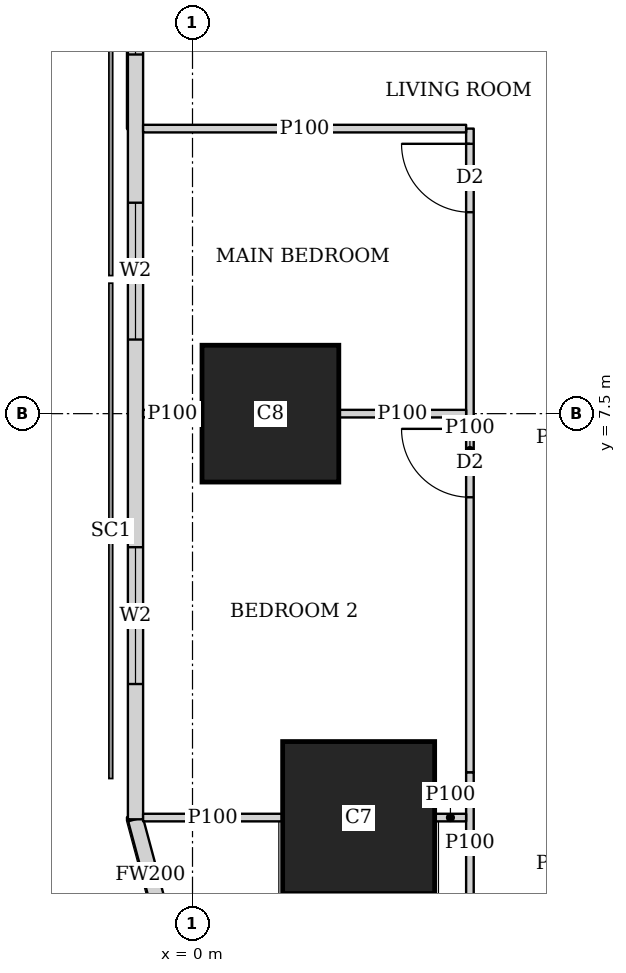
"""IFC4 building model, lengths in metres.
Left out: names, types, materials, properties, quantities, classifications, styles, units other than length and angle.
Written with IfcOpenShell. Run it as: python <this file> out.ifc"""

import sys

from ifc_helpers import new_model, si_unit, direction, frame, frame_2d, origin, origin_2d, place, context, subcontext, project, spatial, rectangle, extrude, element, fill, save


model = new_model("IFC4")
c1 = context("Model", 3, precision=1e-05, world=origin(), true_north=direction((0.0, 1.0)))
c2 = subcontext(c1, "Body", "Model", "MODEL_VIEW")
j1 = project(units=[si_unit("LENGTHUNIT", "METRE"), si_unit("PLANEANGLEUNIT", "RADIAN")], contexts=[c1])
p1 = place(None, origin())
s1 = spatial("IfcSite", under=j1, at=p1, CompositionType="ELEMENT")
p2 = place(p1, origin())
s2 = spatial("IfcBuilding", under=s1, at=p2, CompositionType="ELEMENT")
p3 = place(p2, frame((0.0, 0.0, 180.8)))
s3 = spatial("IfcBuildingStorey", under=s2, at=p3, CompositionType="ELEMENT", Elevation=180.8)
p4 = place(p3, frame((2.186, 2.186, 0.0), z_axis=(0.0, 0.0, 1.0), x_axis=(1.0, 0.0, 0.0)))
e1 = element("IfcColumn", 1, at=p4, inside=s3, PredefinedType="COLUMN", context=c2, shape_type="SweptSolid", body=[
    extrude(rectangle(XDim=2.0, YDim=2.0, at=origin_2d()), origin(), (0.0, 0.0, 1.0), 3.75),
])
p5 = place(p3, frame((1.025, 7.5, 0.0), z_axis=(0.0, 0.0, 1.0), x_axis=(1.0, 0.0, 0.0)))
e2 = element("IfcColumn", 2, at=p5, inside=s3, PredefinedType="COLUMN", context=c2, shape_type="SweptSolid", body=[
    extrude(rectangle(XDim=1.8, YDim=1.8, at=origin_2d()), origin(), (0.0, 0.0, 1.0), 3.75),
])
p6 = place(p3, frame((-0.75, 42.837, 0.0), z_axis=(0.0, 0.0, 1.0), x_axis=(0.0, -1.0, 0.0)))
e3 = element("IfcWall", 3, at=p6, inside=s3, PredefinedType="SOLIDWALL", context=c2, shape_type="SweptSolid", body=[
    extrude(rectangle(XDim=40.674, YDim=0.2, at=frame_2d((20.337, 0.0))), origin(), (0.0, 0.0, 1.0), 3.5),
])
p7 = place(p6, frame((1.78, 0.0, 0.9)))
e4 = element("IfcOpeningElement", 4, at=p7, cuts=e3, PredefinedType="OPENING", context=c2, shape_type="SweptSolid", body=[
    extrude(rectangle(XDim=1.8, YDim=1.5, at=frame_2d((0.9, 0.75))), frame((0.0, 0.11, 0.0), z_axis=(0.0, -1.0, 0.0), x_axis=(1.0, 0.0, 0.0)), (0.0, 0.0, 1.0), 0.22),
])
p8 = place(p6, frame((6.312, 0.0, 0.9)))
e5 = element("IfcOpeningElement", 5, at=p8, cuts=e3, PredefinedType="OPENING", context=c2, shape_type="SweptSolid", body=[
    extrude(rectangle(XDim=1.8, YDim=1.5, at=frame_2d((0.9, 0.75))), frame((0.0, 0.11, 0.0), z_axis=(0.0, -1.0, 0.0), x_axis=(1.0, 0.0, 0.0)), (0.0, 0.0, 1.0), 0.22),
])
p9 = place(p6, frame((10.062, 0.0, 0.9)))
e6 = element("IfcOpeningElement", 6, at=p9, cuts=e3, PredefinedType="OPENING", context=c2, shape_type="SweptSolid", body=[
    extrude(rectangle(XDim=1.8, YDim=1.5, at=frame_2d((0.9, 0.75))), frame((0.0, 0.11, 0.0), z_axis=(0.0, -1.0, 0.0), x_axis=(1.0, 0.0, 0.0)), (0.0, 0.0, 1.0), 0.22),
])
p10 = place(p6, frame((13.812, 0.0, 0.9)))
e7 = element("IfcOpeningElement", 7, at=p10, cuts=e3, PredefinedType="OPENING", context=c2, shape_type="SweptSolid", body=[
    extrude(rectangle(XDim=1.8, YDim=1.5, at=frame_2d((0.9, 0.75))), frame((0.0, 0.11, 0.0), z_axis=(0.0, -1.0, 0.0), x_axis=(1.0, 0.0, 0.0)), (0.0, 0.0, 1.0), 0.22),
])
p11 = place(p6, frame((17.562, 0.0, 0.9)))
e8 = element("IfcOpeningElement", 8, at=p11, cuts=e3, PredefinedType="OPENING", context=c2, shape_type="SweptSolid", body=[
    extrude(rectangle(XDim=1.8, YDim=1.5, at=frame_2d((0.9, 0.75))), frame((0.0, 0.11, 0.0), z_axis=(0.0, -1.0, 0.0), x_axis=(1.0, 0.0, 0.0)), (0.0, 0.0, 1.0), 0.22),
])
p12 = place(p6, frame((21.312, 0.0, 0.9)))
e9 = element("IfcOpeningElement", 9, at=p12, cuts=e3, PredefinedType="OPENING", context=c2, shape_type="SweptSolid", body=[
    extrude(rectangle(XDim=1.8, YDim=1.5, at=frame_2d((0.9, 0.75))), frame((0.0, 0.11, 0.0), z_axis=(0.0, -1.0, 0.0), x_axis=(1.0, 0.0, 0.0)), (0.0, 0.0, 1.0), 0.22),
])
p13 = place(p6, frame((25.062, 0.0, 0.9)))
e10 = element("IfcOpeningElement", 10, at=p13, cuts=e3, PredefinedType="OPENING", context=c2, shape_type="SweptSolid", body=[
    extrude(rectangle(XDim=1.8, YDim=1.5, at=frame_2d((0.9, 0.75))), frame((0.0, 0.11, 0.0), z_axis=(0.0, -1.0, 0.0), x_axis=(1.0, 0.0, 0.0)), (0.0, 0.0, 1.0), 0.22),
])
p14 = place(p6, frame((28.812, 0.0, 0.9)))
e11 = element("IfcOpeningElement", 11, at=p14, cuts=e3, PredefinedType="OPENING", context=c2, shape_type="SweptSolid", body=[
    extrude(rectangle(XDim=1.8, YDim=1.5, at=frame_2d((0.9, 0.75))), frame((0.0, 0.11, 0.0), z_axis=(0.0, -1.0, 0.0), x_axis=(1.0, 0.0, 0.0)), (0.0, 0.0, 1.0), 0.22),
])
p15 = place(p6, frame((32.562, 0.0, 0.9)))
e12 = element("IfcOpeningElement", 12, at=p15, cuts=e3, PredefinedType="OPENING", context=c2, shape_type="SweptSolid", body=[
    extrude(rectangle(XDim=1.8, YDim=1.5, at=frame_2d((0.9, 0.75))), frame((0.0, 0.11, 0.0), z_axis=(0.0, -1.0, 0.0), x_axis=(1.0, 0.0, 0.0)), (0.0, 0.0, 1.0), 0.22),
])
p16 = place(p6, frame((37.094, 0.0, 0.9)))
e13 = element("IfcOpeningElement", 13, at=p16, cuts=e3, PredefinedType="OPENING", context=c2, shape_type="SweptSolid", body=[
    extrude(rectangle(XDim=1.8, YDim=1.5, at=frame_2d((0.9, 0.75))), frame((0.0, 0.11, 0.0), z_axis=(0.0, -1.0, 0.0), x_axis=(1.0, 0.0, 0.0)), (0.0, 0.0, 1.0), 0.22),
])
p17 = place(p3, frame((-0.75, 2.163, 0.0), z_axis=(0.0, 0.0, 1.0), x_axis=(0.259168954497, -0.965832000415, 0.0)))
e14 = element("IfcWall", 14, at=p17, inside=s3, PredefinedType="SOLIDWALL", context=c2, shape_type="SweptSolid", body=[
    extrude(rectangle(XDim=1.513, YDim=0.2, at=frame_2d((0.756, 0.0))), origin(), (0.0, 0.0, 1.0), 3.5),
])
p18 = place(p3, frame((3.65, 0.912, 0.0), z_axis=(0.0, 0.0, 1.0), x_axis=(0.0, 1.0, 0.0)))
e15 = element("IfcWall", 15, at=p18, inside=s3, PredefinedType="PARTITIONING", context=c2, shape_type="SweptSolid", body=[
    extrude(rectangle(XDim=1.87, YDim=0.1, at=frame_2d((0.935, 0.0))), origin(), (0.0, 0.0, 1.0), 2.1),
])
p19 = place(p3, frame((3.65, 2.782, 0.0), z_axis=(0.0, 0.0, 1.0), x_axis=(0.0, 1.0, 0.0)))
e16 = element("IfcWall", 16, at=p19, inside=s3, PredefinedType="PARTITIONING", context=c2, shape_type="SweptSolid", body=[
    extrude(rectangle(XDim=8.468, YDim=0.1, at=frame_2d((4.234, 0.0))), origin(), (0.0, 0.0, 1.0), 3.5),
])
p20 = place(p19, frame((7.368, 0.0, 0.0)))
e17 = element("IfcOpeningElement", 17, at=p20, cuts=e16, PredefinedType="OPENING", context=c2, shape_type="SweptSolid", body=[
    extrude(rectangle(XDim=0.9, YDim=2.1, at=frame_2d((0.45, 1.05))), frame((0.0, 0.06, 0.0), z_axis=(0.0, -1.0, 0.0), x_axis=(1.0, 0.0, 0.0)), (0.0, 0.0, 1.0), 0.12),
])
p21 = place(p19, frame((3.618, 0.0, 0.0)))
e18 = element("IfcOpeningElement", 18, at=p21, cuts=e16, PredefinedType="OPENING", context=c2, shape_type="SweptSolid", body=[
    extrude(rectangle(XDim=0.9, YDim=2.1, at=frame_2d((0.45, 1.05))), frame((0.0, 0.06, 0.0), z_axis=(0.0, -1.0, 0.0), x_axis=(1.0, 0.0, 0.0)), (0.0, 0.0, 1.0), 0.12),
])
p22 = place(p3, frame((-0.65, 2.186, 0.0), z_axis=(0.0, 0.0, 1.0), x_axis=(1.0, 0.0, 0.0)))
e19 = element("IfcWall", 19, at=p22, inside=s3, PredefinedType="PARTITIONING", context=c2, shape_type="SweptSolid", body=[
    extrude(rectangle(XDim=1.835, YDim=0.1, at=frame_2d((0.917, 0.0))), origin(), (0.0, 0.0, 1.0), 3.5),
])
p23 = place(p3, frame((3.187, 2.186, 0.0), z_axis=(0.0, 0.0, 1.0), x_axis=(1.0, 0.0, 0.0)))
e20 = element("IfcWall", 20, at=p23, inside=s3, PredefinedType="PARTITIONING", context=c2, shape_type="SweptSolid", body=[
    extrude(rectangle(XDim=0.413, YDim=0.1, at=frame_2d((0.207, 0.0))), origin(), (0.0, 0.0, 1.0), 2.1),
])
p24 = place(p3, frame((-0.65, 7.5, 0.0), z_axis=(0.0, 0.0, 1.0), x_axis=(1.0, 0.0, 0.0)))
e21 = element("IfcWall", 21, at=p24, inside=s3, PredefinedType="PARTITIONING", context=c2, shape_type="SweptSolid", body=[
    extrude(rectangle(XDim=0.774, YDim=0.1, at=frame_2d((0.387, 0.0))), origin(), (0.0, 0.0, 1.0), 3.5),
])
p25 = place(p3, frame((1.926, 7.5, 0.0), z_axis=(0.0, 0.0, 1.0), x_axis=(1.0, 0.0, 0.0)))
e22 = element("IfcWall", 22, at=p25, inside=s3, PredefinedType="PARTITIONING", context=c2, shape_type="SweptSolid", body=[
    extrude(rectangle(XDim=1.674, YDim=0.1, at=frame_2d((0.837, 0.0))), origin(), (0.0, 0.0, 1.0), 2.1),
])
p26 = place(p3, frame((-0.65, 11.25, 0.0), z_axis=(0.0, 0.0, 1.0), x_axis=(1.0, 0.0, 0.0)))
e23 = element("IfcWall", 23, at=p26, inside=s3, PredefinedType="PARTITIONING", context=c2, shape_type="SweptSolid", body=[
    extrude(rectangle(XDim=4.25, YDim=0.1, at=frame_2d((2.125, 0.0))), origin(), (0.0, 0.0, 1.0), 2.1),
])
p27 = place(p14, origin())
e24 = element("IfcWindow", 24, at=p27, inside=s3, PartitioningType="SINGLE_PANEL", PredefinedType="WINDOW", context=c2, shape_type="SweptSolid", body=[
    extrude(rectangle(XDim=1.8, YDim=1.5, at=frame_2d((0.9, 0.75))), frame((0.0, 0.03, 0.0), z_axis=(0.0, -1.0, 0.0), x_axis=(1.0, 0.0, 0.0)), (0.0, 0.0, 1.0), 0.06),
])
fill(e11, e24)
p28 = place(p15, origin())
e25 = element("IfcWindow", 25, at=p28, inside=s3, PartitioningType="SINGLE_PANEL", PredefinedType="WINDOW", context=c2, shape_type="SweptSolid", body=[
    extrude(rectangle(XDim=1.8, YDim=1.5, at=frame_2d((0.9, 0.75))), frame((0.0, 0.03, 0.0), z_axis=(0.0, -1.0, 0.0), x_axis=(1.0, 0.0, 0.0)), (0.0, 0.0, 1.0), 0.06),
])
fill(e12, e25)
p29 = place(p16, origin())
e26 = element("IfcWindow", 26, at=p29, inside=s3, PartitioningType="SINGLE_PANEL", PredefinedType="WINDOW", context=c2, shape_type="SweptSolid", body=[
    extrude(rectangle(XDim=1.8, YDim=1.5, at=frame_2d((0.9, 0.75))), frame((0.0, 0.03, 0.0), z_axis=(0.0, -1.0, 0.0), x_axis=(1.0, 0.0, 0.0)), (0.0, 0.0, 1.0), 0.06),
])
fill(e13, e26)
p30 = place(p20, origin())
e27 = element("IfcDoor", 27, at=p30, inside=s3, OperationType="SINGLE_SWING_RIGHT", PredefinedType="DOOR", context=c2, shape_type="SweptSolid", body=[
    extrude(rectangle(XDim=0.9, YDim=2.1, at=frame_2d((0.45, 1.05))), frame((0.0, 0.025, 0.0), z_axis=(0.0, -1.0, 0.0), x_axis=(1.0, 0.0, 0.0)), (0.0, 0.0, 1.0), 0.05),
])
fill(e17, e27)
p31 = place(p21, origin())
e28 = element("IfcDoor", 28, at=p31, inside=s3, OperationType="SINGLE_SWING_RIGHT", PredefinedType="DOOR", context=c2, shape_type="SweptSolid", body=[
    extrude(rectangle(XDim=0.9, YDim=2.1, at=frame_2d((0.45, 1.05))), frame((0.0, 0.025, 0.0), z_axis=(0.0, -1.0, 0.0), x_axis=(1.0, 0.0, 0.0)), (0.0, 0.0, 1.0), 0.05),
])
fill(e18, e28)
save(model, sys.argv[1])
